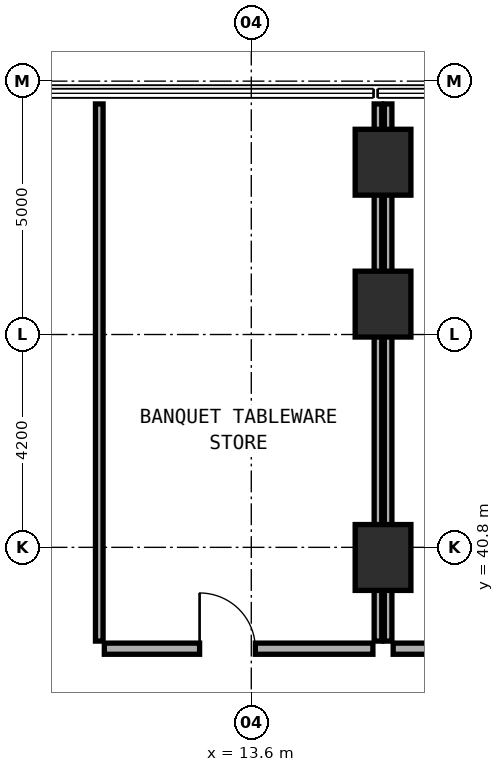
"""IFC4 building model, lengths in metres.
Left out: names, types, materials, properties, quantities, classifications, styles, units other than length and angle.
Written with IfcOpenShell. Run it as: python <this file> out.ifc"""

import sys

from ifc_helpers import new_model, si_unit, direction, frame, frame_2d, origin, origin_2d, place, context, subcontext, project, spatial, rectangle, extrude, element, fill, save


model = new_model("IFC4")
c1 = context("Model", 3, precision=1e-05, world=origin(), true_north=direction((0.0, 1.0)))
c2 = subcontext(c1, "Body", "Model", "MODEL_VIEW")
j1 = project(units=[si_unit("LENGTHUNIT", "METRE"), si_unit("PLANEANGLEUNIT", "RADIAN")], contexts=[c1])
p1 = place(None, origin())
s1 = spatial("IfcSite", under=j1, at=p1, CompositionType="ELEMENT")
p2 = place(p1, origin())
s2 = spatial("IfcBuilding", under=s1, at=p2, CompositionType="ELEMENT")
p3 = place(p2, frame((0.0, 0.0, 5.4)))
s3 = spatial("IfcBuildingStorey", under=s2, at=p3, CompositionType="ELEMENT", Elevation=5.4)
for number, where, z_axis, x_axis in (
    (1, (16.2, 40.6, 0.0), (0.0, 0.0, 1.0), (1.0, 0.0, 0.0)),
    (2, (16.2, 48.4, 0.0), (0.0, 0.0, 1.0), (1.0, 0.0, 0.0)),
    (3, (16.2, 45.6, 0.0), (0.0, 0.0, 1.0), (1.0, 0.0, 0.0)),
):
    element("IfcColumn", number, at=place(p3, frame(where, z_axis=z_axis, x_axis=x_axis)), inside=s3, PredefinedType="COLUMN", context=c2, shape_type="SweptSolid", body=[
        extrude(rectangle(XDim=1.1, YDim=1.3, at=origin_2d()), origin(), (0.0, 0.0, 1.0), 4.8),
    ])
p4 = place(p3, frame((16.3, 38.95, 0.0), z_axis=(0.0, 0.0, 1.0), x_axis=(0.0, 1.0, 0.0)))
e4 = element("IfcWall", 4, at=p4, inside=s3, PredefinedType="PARTITIONING", context=c2, shape_type="SweptSolid", body=[
    extrude(rectangle(XDim=10.6, YDim=0.15, at=frame_2d((5.3, 0.0))), origin(), (0.0, 0.0, 1.0), 3.825),
])
p5 = place(p3, frame((16.4, 38.8, 0.0), z_axis=(0.0, 0.0, 1.0), x_axis=(1.0, 0.0, 0.0)))
e5 = element("IfcWall", 5, at=p5, inside=s3, PredefinedType="SOLIDWALL", context=c2, shape_type="SweptSolid", body=[
    extrude(rectangle(XDim=3.1, YDim=0.22, at=frame_2d((1.55, 0.0))), origin(), (0.0, 0.0, 1.0), 4.45),
])
p6 = place(p5, frame((0.89, 0.0, 0.0)))
e6 = element("IfcOpeningElement", 6, at=p6, cuts=e5, PredefinedType="OPENING", context=c2, shape_type="SweptSolid", body=[
    extrude(rectangle(XDim=1.1, YDim=2.1, at=frame_2d((0.55, 1.05))), frame((0.0, 0.12, 0.0), z_axis=(0.0, -1.0, 0.0), x_axis=(1.0, 0.0, 0.0)), (0.0, 0.0, 1.0), 0.24),
])
for number, where, z_axis, x_axis in (
    (7, (10.6, 38.95, 0.0), (0.0, 0.0, 1.0), (0.0, 1.0, 0.0)),
    (8, (16.1, 38.95, 0.0), (0.0, 0.0, 1.0), (0.0, 1.0, 0.0)),
):
    element("IfcWall", number, at=place(p3, frame(where, z_axis=z_axis, x_axis=x_axis)), inside=s3, PredefinedType="PARTITIONING", context=c2, shape_type="SweptSolid", body=[
        extrude(rectangle(XDim=10.6, YDim=0.15, at=frame_2d((5.3, 0.0))), origin(), (0.0, 0.0, 1.0), 3.625),
    ])
p7 = place(p3, frame((10.7, 38.8, 0.0), z_axis=(0.0, 0.0, 1.0), x_axis=(1.0, 0.0, 0.0)))
e9 = element("IfcWall", 9, at=p7, inside=s3, PredefinedType="SOLIDWALL", context=c2, shape_type="SweptSolid", body=[
    extrude(rectangle(XDim=5.3, YDim=0.22, at=frame_2d((2.65, 0.0))), origin(), (0.0, 0.0, 1.0), 4.45),
])
p8 = place(p7, frame((1.88, 0.0, 0.0)))
e10 = element("IfcOpeningElement", 10, at=p8, cuts=e9, PredefinedType="OPENING", context=c2, shape_type="SweptSolid", body=[
    extrude(rectangle(XDim=1.1, YDim=2.1, at=frame_2d((0.55, 1.05))), frame((0.0, 0.12, 0.0), z_axis=(0.0, -1.0, 0.0), x_axis=(1.0, 0.0, 0.0)), (0.0, 0.0, 1.0), 0.24),
])
p9 = place(p8, origin())
e11 = element("IfcDoor", 11, at=p9, inside=s3, OperationType="SINGLE_SWING_LEFT", PredefinedType="DOOR", context=c2, shape_type="SweptSolid", body=[
    extrude(rectangle(XDim=1.1, YDim=2.1, at=frame_2d((0.55, 1.05))), frame((0.0, 0.025, 0.0), z_axis=(0.0, -1.0, 0.0), x_axis=(1.0, 0.0, 0.0)), (0.0, 0.0, 1.0), 0.05),
])
fill(e10, e11)
save(model, sys.argv[1])
